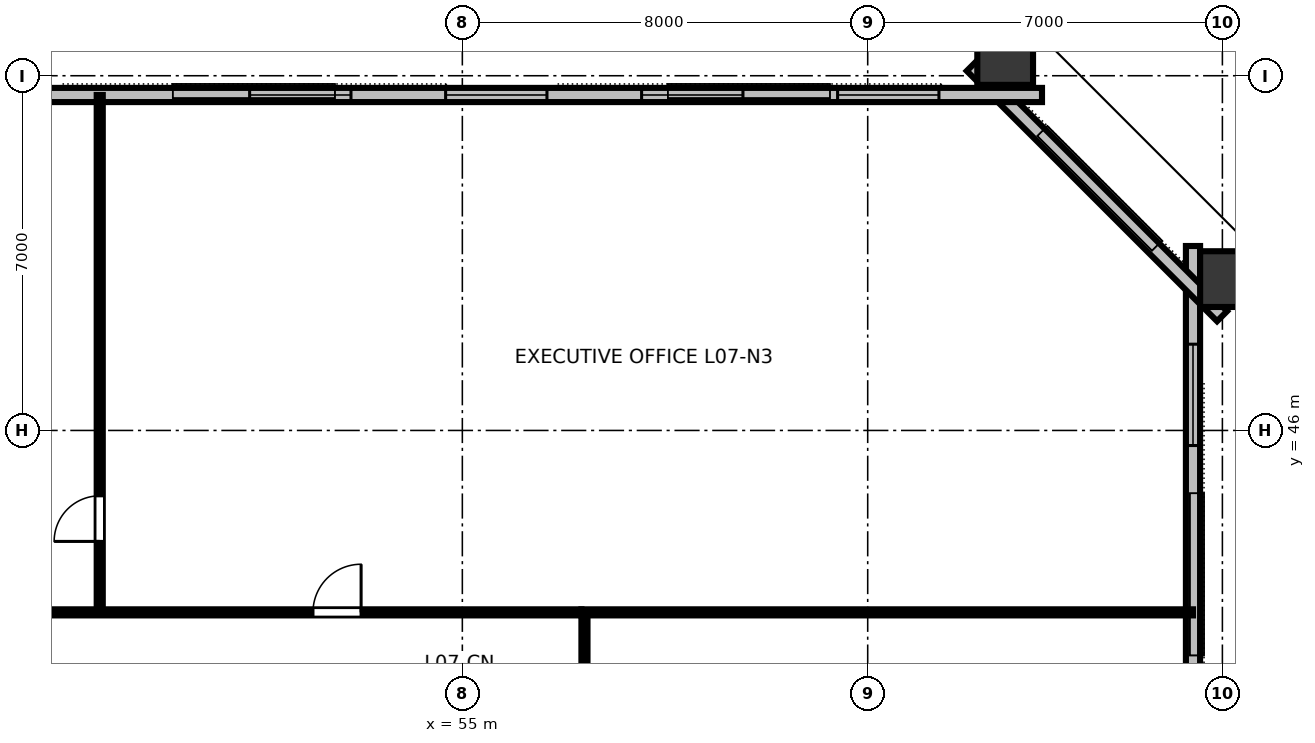
"""IFC4 building model, lengths in metres.
Left out: names, types, materials, properties, quantities, classifications, styles, units other than length and angle.
Written with IfcOpenShell. Run it as: python <this file> out.ifc"""

import sys

from ifc_helpers import new_model, si_unit, direction, frame, frame_2d, origin, origin_2d, place, context, subcontext, project, spatial, rectangle, hollow_rectangle, extrude, element, fill, save


model = new_model("IFC4")
c1 = context("Model", 3, precision=1e-05, world=origin(), true_north=direction((0.0, 1.0)))
c2 = subcontext(c1, "Body", "Model", "MODEL_VIEW")
j1 = project(units=[si_unit("LENGTHUNIT", "METRE"), si_unit("PLANEANGLEUNIT", "RADIAN")], contexts=[c1])
p1 = place(None, origin())
s1 = spatial("IfcSite", under=j1, at=p1, CompositionType="ELEMENT")
p2 = place(p1, origin())
s2 = spatial("IfcBuilding", under=s1, at=p2, CompositionType="ELEMENT")
p3 = place(p2, frame((0.0, 0.0, 31.6)))
s3 = spatial("IfcBuildingStorey", under=s2, at=p3, CompositionType="ELEMENT", Elevation=31.6)
for number, where, z_axis, x_axis in (
    (1, (70.211, 48.987, 0.0), (0.0, 0.0, 1.0), (0.0, 1.0, 0.0)),
    (2, (65.713, 53.469, 0.0), (0.0, 0.0, 1.0), (1.0, 0.0, 0.0)),
):
    element("IfcColumn", number, at=place(p3, frame(where, z_axis=z_axis, x_axis=x_axis)), inside=s3, PredefinedType="COLUMN", context=c2, shape_type="SweptSolid", body=[
        extrude(hollow_rectangle(XDim=1.1, YDim=1.3, WallThickness=0.07, at=origin_2d()), origin(), (0.0, 0.0, 1.0), 3.148),
    ])
p4 = place(p3, frame((69.42, 14.36, 0.0), z_axis=(0.0, 0.0, 1.0), x_axis=(0.0, 1.0, 0.0)))
e3 = element("IfcWall", 3, at=p4, inside=s3, PredefinedType="STANDARD", context=c2, shape_type="SweptSolid", body=[
    extrude(rectangle(XDim=35.28, YDim=0.28, at=frame_2d((17.64, 0.0))), origin(), (0.0, 0.0, 1.0), 3.15),
])
p5 = place(p4, frame((1.938, 0.0, 0.8)))
e4 = element("IfcOpeningElement", 4, at=p5, cuts=e3, PredefinedType="OPENING", context=c2, shape_type="SweptSolid", body=[
    extrude(rectangle(XDim=2.0, YDim=1.95, at=frame_2d((1.0, 0.975))), frame((0.0, 0.15, 0.0), z_axis=(0.0, -1.0, 0.0), x_axis=(1.0, 0.0, 0.0)), (0.0, 0.0, 1.0), 0.3),
])
p6 = place(p4, frame((9.289, 0.0, 0.8)))
e5 = element("IfcOpeningElement", 5, at=p6, cuts=e3, PredefinedType="OPENING", context=c2, shape_type="SweptSolid", body=[
    extrude(rectangle(XDim=2.0, YDim=1.95, at=frame_2d((1.0, 0.975))), frame((0.0, 0.15, 0.0), z_axis=(0.0, -1.0, 0.0), x_axis=(1.0, 0.0, 0.0)), (0.0, 0.0, 1.0), 0.3),
])
p7 = place(p4, frame((12.964, 0.0, 0.8)))
e6 = element("IfcOpeningElement", 6, at=p7, cuts=e3, PredefinedType="OPENING", context=c2, shape_type="SweptSolid", body=[
    extrude(rectangle(XDim=2.0, YDim=1.95, at=frame_2d((1.0, 0.975))), frame((0.0, 0.15, 0.0), z_axis=(0.0, -1.0, 0.0), x_axis=(1.0, 0.0, 0.0)), (0.0, 0.0, 1.0), 0.3),
])
p8 = place(p4, frame((20.316, 0.0, 0.8)))
e7 = element("IfcOpeningElement", 7, at=p8, cuts=e3, PredefinedType="OPENING", context=c2, shape_type="SweptSolid", body=[
    extrude(rectangle(XDim=2.0, YDim=1.95, at=frame_2d((1.0, 0.975))), frame((0.0, 0.15, 0.0), z_axis=(0.0, -1.0, 0.0), x_axis=(1.0, 0.0, 0.0)), (0.0, 0.0, 1.0), 0.3),
])
p9 = place(p4, frame((23.991, 0.0, 0.8)))
e8 = element("IfcOpeningElement", 8, at=p9, cuts=e3, PredefinedType="OPENING", context=c2, shape_type="SweptSolid", body=[
    extrude(rectangle(XDim=2.0, YDim=1.95, at=frame_2d((1.0, 0.975))), frame((0.0, 0.15, 0.0), z_axis=(0.0, -1.0, 0.0), x_axis=(1.0, 0.0, 0.0)), (0.0, 0.0, 1.0), 0.3),
])
p10 = place(p4, frame((31.342, 0.0, 0.8)))
e9 = element("IfcOpeningElement", 9, at=p10, cuts=e3, PredefinedType="OPENING", context=c2, shape_type="SweptSolid", body=[
    extrude(rectangle(XDim=2.0, YDim=1.95, at=frame_2d((1.0, 0.975))), frame((0.0, 0.15, 0.0), z_axis=(0.0, -1.0, 0.0), x_axis=(1.0, 0.0, 0.0)), (0.0, 0.0, 1.0), 0.3),
])
p11 = place(p3, frame((69.994, 48.254, 0.0), z_axis=(0.0, 0.0, 1.0), x_axis=(-0.707106781187, 0.707106781187, 0.0)))
e10 = element("IfcWall", 10, at=p11, inside=s3, PredefinedType="STANDARD", context=c2, shape_type="SweptSolid", body=[
    extrude(rectangle(XDim=6.985, YDim=0.28, at=frame_2d((3.493, 0.0))), origin(), (0.0, 0.0, 1.0), 3.15),
])
p12 = place(p3, frame((66.44, 52.62, 0.0), z_axis=(0.0, 0.0, 1.0), x_axis=(-1.0, 0.0, 0.0)))
e11 = element("IfcWall", 11, at=p12, inside=s3, PredefinedType="STANDARD", context=c2, shape_type="SweptSolid", body=[
    extrude(rectangle(XDim=40.88, YDim=0.28, at=frame_2d((20.44, 0.0))), origin(), (0.0, 0.0, 1.0), 3.15),
])
p13 = place(p12, frame((2.034, 0.0, 0.8)))
e12 = element("IfcOpeningElement", 12, at=p13, cuts=e11, PredefinedType="OPENING", context=c2, shape_type="SweptSolid", body=[
    extrude(rectangle(XDim=2.0, YDim=1.95, at=frame_2d((1.0, 0.975))), frame((0.0, 0.15, 0.0), z_axis=(0.0, -1.0, 0.0), x_axis=(1.0, 0.0, 0.0)), (0.0, 0.0, 1.0), 0.3),
])
p14 = place(p12, frame((5.902, 0.0, 0.8)))
e13 = element("IfcOpeningElement", 13, at=p14, cuts=e11, PredefinedType="OPENING", context=c2, shape_type="SweptSolid", body=[
    extrude(rectangle(XDim=2.0, YDim=1.95, at=frame_2d((1.0, 0.975))), frame((0.0, 0.15, 0.0), z_axis=(0.0, -1.0, 0.0), x_axis=(1.0, 0.0, 0.0)), (0.0, 0.0, 1.0), 0.3),
])
p15 = place(p12, frame((9.77, 0.0, 0.8)))
e14 = element("IfcOpeningElement", 14, at=p15, cuts=e11, PredefinedType="OPENING", context=c2, shape_type="SweptSolid", body=[
    extrude(rectangle(XDim=2.0, YDim=1.95, at=frame_2d((1.0, 0.975))), frame((0.0, 0.15, 0.0), z_axis=(0.0, -1.0, 0.0), x_axis=(1.0, 0.0, 0.0)), (0.0, 0.0, 1.0), 0.3),
])
p16 = place(p12, frame((13.638, 0.0, 0.8)))
e15 = element("IfcOpeningElement", 15, at=p16, cuts=e11, PredefinedType="OPENING", context=c2, shape_type="SweptSolid", body=[
    extrude(rectangle(XDim=2.0, YDim=1.95, at=frame_2d((1.0, 0.975))), frame((0.0, 0.15, 0.0), z_axis=(0.0, -1.0, 0.0), x_axis=(1.0, 0.0, 0.0)), (0.0, 0.0, 1.0), 0.3),
])
p17 = place(p12, frame((25.242, 0.0, 0.8)))
e16 = element("IfcOpeningElement", 16, at=p17, cuts=e11, PredefinedType="OPENING", context=c2, shape_type="SweptSolid", body=[
    extrude(rectangle(XDim=2.0, YDim=1.95, at=frame_2d((1.0, 0.975))), frame((0.0, 0.15, 0.0), z_axis=(0.0, -1.0, 0.0), x_axis=(1.0, 0.0, 0.0)), (0.0, 0.0, 1.0), 0.3),
])
p18 = place(p12, frame((29.11, 0.0, 0.8)))
e17 = element("IfcOpeningElement", 17, at=p18, cuts=e11, PredefinedType="OPENING", context=c2, shape_type="SweptSolid", body=[
    extrude(rectangle(XDim=2.0, YDim=1.95, at=frame_2d((1.0, 0.975))), frame((0.0, 0.15, 0.0), z_axis=(0.0, -1.0, 0.0), x_axis=(1.0, 0.0, 0.0)), (0.0, 0.0, 1.0), 0.3),
])
p19 = place(p12, frame((32.978, 0.0, 0.8)))
e18 = element("IfcOpeningElement", 18, at=p19, cuts=e11, PredefinedType="OPENING", context=c2, shape_type="SweptSolid", body=[
    extrude(rectangle(XDim=2.0, YDim=1.95, at=frame_2d((1.0, 0.975))), frame((0.0, 0.15, 0.0), z_axis=(0.0, -1.0, 0.0), x_axis=(1.0, 0.0, 0.0)), (0.0, 0.0, 1.0), 0.3),
])
p20 = place(p12, frame((36.846, 0.0, 0.8)))
e19 = element("IfcOpeningElement", 19, at=p20, cuts=e11, PredefinedType="OPENING", context=c2, shape_type="SweptSolid", body=[
    extrude(rectangle(XDim=2.0, YDim=1.95, at=frame_2d((1.0, 0.975))), frame((0.0, 0.15, 0.0), z_axis=(0.0, -1.0, 0.0), x_axis=(1.0, 0.0, 0.0)), (0.0, 0.0, 1.0), 0.3),
])
p21 = place(p3, frame((47.844, 42.41, 0.0), z_axis=(0.0, 0.0, 1.0), x_axis=(0.0, 1.0, 0.0)))
e20 = element("IfcWall", 20, at=p21, inside=s3, PredefinedType="PARTITIONING", context=c2, shape_type="SweptSolid", body=[
    extrude(rectangle(XDim=10.21, YDim=0.12, at=frame_2d((5.105, 0.0))), origin(), (0.0, 0.0, 1.0), 2.43),
])
p22 = place(p21, frame((1.4, 0.0, 0.0)))
e21 = element("IfcOpeningElement", 21, at=p22, cuts=e20, PredefinedType="OPENING", context=c2, shape_type="SweptSolid", body=[
    extrude(rectangle(XDim=0.9, YDim=2.15, at=frame_2d((0.45, 1.075))), frame((0.0, 0.07, 0.0), z_axis=(0.0, -1.0, 0.0), x_axis=(1.0, 0.0, 0.0)), (0.0, 0.0, 1.0), 0.14),
])
p23 = place(p3, frame((34.65, 42.41, 0.0), z_axis=(0.0, 0.0, 1.0), x_axis=(1.0, 0.0, 0.0)))
e22 = element("IfcWall", 22, at=p23, inside=s3, PredefinedType="PARTITIONING", context=c2, shape_type="SweptSolid", body=[
    extrude(rectangle(XDim=22.7, YDim=0.12, at=frame_2d((11.35, 0.0))), origin(), (0.0, 0.0, 1.0), 2.43),
])
p24 = place(p23, frame((3.981, 0.0, 0.0)))
e23 = element("IfcOpeningElement", 23, at=p24, cuts=e22, PredefinedType="OPENING", context=c2, shape_type="SweptSolid", body=[
    extrude(rectangle(XDim=0.95, YDim=2.15, at=frame_2d((0.475, 1.075))), frame((0.0, 0.07, 0.0), z_axis=(0.0, -1.0, 0.0), x_axis=(1.0, 0.0, 0.0)), (0.0, 0.0, 1.0), 0.14),
])
p25 = place(p23, frame((10.508, 0.0, 0.0)))
e24 = element("IfcOpeningElement", 24, at=p25, cuts=e22, PredefinedType="OPENING", context=c2, shape_type="SweptSolid", body=[
    extrude(rectangle(XDim=0.95, YDim=2.15, at=frame_2d((0.475, 1.075))), frame((0.0, 0.07, 0.0), z_axis=(0.0, -1.0, 0.0), x_axis=(1.0, 0.0, 0.0)), (0.0, 0.0, 1.0), 0.14),
])
p26 = place(p23, frame((17.402, 0.0, 0.0)))
e25 = element("IfcOpeningElement", 25, at=p26, cuts=e22, PredefinedType="OPENING", context=c2, shape_type="SweptSolid", body=[
    extrude(rectangle(XDim=0.95, YDim=2.15, at=frame_2d((0.475, 1.075))), frame((0.0, 0.07, 0.0), z_axis=(0.0, -1.0, 0.0), x_axis=(1.0, 0.0, 0.0)), (0.0, 0.0, 1.0), 0.14),
])
p27 = place(p3, frame((57.41, 21.65, 0.0), z_axis=(0.0, 0.0, 1.0), x_axis=(0.0, 1.0, 0.0)))
e26 = element("IfcWall", 26, at=p27, inside=s3, PredefinedType="PARTITIONING", context=c2, shape_type="SweptSolid", body=[
    extrude(rectangle(XDim=20.7, YDim=0.12, at=frame_2d((10.35, 0.0))), origin(), (0.0, 0.0, 1.0), 2.43),
])
p28 = place(p27, frame((5.31, 0.0, 0.0)))
e27 = element("IfcOpeningElement", 27, at=p28, cuts=e26, PredefinedType="OPENING", context=c2, shape_type="SweptSolid", body=[
    extrude(rectangle(XDim=0.95, YDim=2.15, at=frame_2d((0.475, 1.075))), frame((0.0, 0.07, 0.0), z_axis=(0.0, -1.0, 0.0), x_axis=(1.0, 0.0, 0.0)), (0.0, 0.0, 1.0), 0.14),
])
p29 = place(p27, frame((15.459, 0.0, 0.0)))
e28 = element("IfcOpeningElement", 28, at=p29, cuts=e26, PredefinedType="OPENING", context=c2, shape_type="SweptSolid", body=[
    extrude(rectangle(XDim=0.95, YDim=2.15, at=frame_2d((0.475, 1.075))), frame((0.0, 0.07, 0.0), z_axis=(0.0, -1.0, 0.0), x_axis=(1.0, 0.0, 0.0)), (0.0, 0.0, 1.0), 0.14),
])
p30 = place(p3, frame((57.35, 42.41, 0.0), z_axis=(0.0, 0.0, 1.0), x_axis=(1.0, 0.0, 0.0)))
e29 = element("IfcWall", 29, at=p30, inside=s3, PredefinedType="PARTITIONING", context=c2, shape_type="SweptSolid", body=[
    extrude(rectangle(XDim=12.07, YDim=0.12, at=frame_2d((6.035, 0.0))), origin(), (0.0, 0.0, 1.0), 2.43),
])
p31 = place(p10, origin())
e30 = element("IfcWindow", 30, at=p31, inside=s3, PartitioningType="SINGLE_PANEL", PredefinedType="WINDOW", context=c2, shape_type="SweptSolid", body=[
    extrude(rectangle(XDim=2.0, YDim=1.95, at=frame_2d((1.0, 0.975))), frame((0.0, 0.03, 0.0), z_axis=(0.0, -1.0, 0.0), x_axis=(1.0, 0.0, 0.0)), (0.0, 0.0, 1.0), 0.06),
])
fill(e9, e30)
p32 = place(p13, origin())
e31 = element("IfcWindow", 31, at=p32, inside=s3, PartitioningType="SINGLE_PANEL", PredefinedType="WINDOW", context=c2, shape_type="SweptSolid", body=[
    extrude(rectangle(XDim=2.0, YDim=1.95, at=frame_2d((1.0, 0.975))), frame((0.0, 0.03, 0.0), z_axis=(0.0, -1.0, 0.0), x_axis=(1.0, 0.0, 0.0)), (0.0, 0.0, 1.0), 0.06),
])
fill(e12, e31)
p33 = place(p14, origin())
e32 = element("IfcWindow", 32, at=p33, inside=s3, PartitioningType="SINGLE_PANEL", PredefinedType="WINDOW", context=c2, shape_type="SweptSolid", body=[
    extrude(rectangle(XDim=2.0, YDim=1.95, at=frame_2d((1.0, 0.975))), frame((0.0, 0.03, 0.0), z_axis=(0.0, -1.0, 0.0), x_axis=(1.0, 0.0, 0.0)), (0.0, 0.0, 1.0), 0.06),
])
fill(e13, e32)
p34 = place(p15, origin())
e33 = element("IfcWindow", 33, at=p34, inside=s3, PartitioningType="SINGLE_PANEL", PredefinedType="WINDOW", context=c2, shape_type="SweptSolid", body=[
    extrude(rectangle(XDim=2.0, YDim=1.95, at=frame_2d((1.0, 0.975))), frame((0.0, 0.03, 0.0), z_axis=(0.0, -1.0, 0.0), x_axis=(1.0, 0.0, 0.0)), (0.0, 0.0, 1.0), 0.06),
])
fill(e14, e33)
p35 = place(p16, origin())
e34 = element("IfcWindow", 34, at=p35, inside=s3, PartitioningType="SINGLE_PANEL", PredefinedType="WINDOW", context=c2, shape_type="SweptSolid", body=[
    extrude(rectangle(XDim=2.0, YDim=1.95, at=frame_2d((1.0, 0.975))), frame((0.0, 0.03, 0.0), z_axis=(0.0, -1.0, 0.0), x_axis=(1.0, 0.0, 0.0)), (0.0, 0.0, 1.0), 0.06),
])
fill(e15, e34)
p36 = place(p22, origin())
e35 = element("IfcDoor", 35, at=p36, inside=s3, OperationType="SINGLE_SWING_LEFT", PredefinedType="DOOR", context=c2, shape_type="SweptSolid", body=[
    extrude(rectangle(XDim=0.9, YDim=2.15, at=frame_2d((0.45, 1.075))), frame((0.0, 0.025, 0.0), z_axis=(0.0, -1.0, 0.0), x_axis=(1.0, 0.0, 0.0)), (0.0, 0.0, 1.0), 0.05),
])
fill(e21, e35)
p37 = place(p26, origin())
e36 = element("IfcDoor", 36, at=p37, inside=s3, OperationType="SINGLE_SWING_RIGHT", PredefinedType="DOOR", context=c2, shape_type="SweptSolid", body=[
    extrude(rectangle(XDim=0.95, YDim=2.15, at=frame_2d((0.475, 1.075))), frame((0.0, 0.025, 0.0), z_axis=(0.0, -1.0, 0.0), x_axis=(1.0, 0.0, 0.0)), (0.0, 0.0, 1.0), 0.05),
])
fill(e25, e36)
save(model, sys.argv[1])
